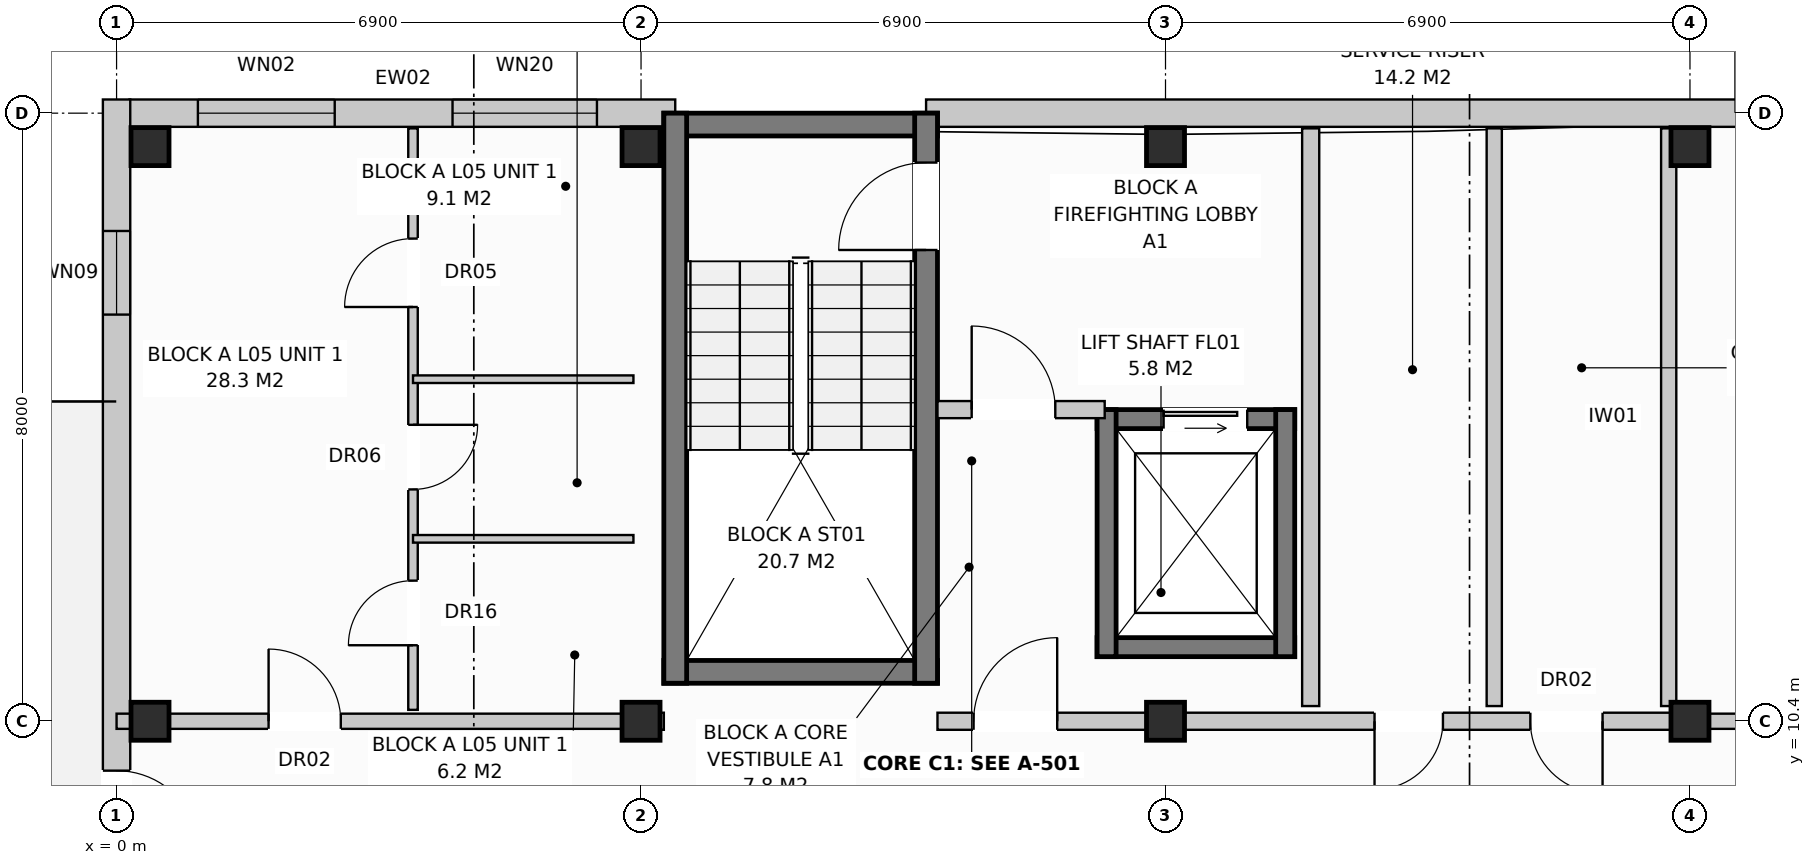
"""IFC4 building model, lengths in metres.
Left out: names, types, materials, properties, quantities, classifications, styles, units other than length and angle.
Written with IfcOpenShell. Run it as: python <this file> out.ifc"""

import sys

from ifc_helpers import new_model, si_unit, direction, frame, frame_2d, origin, origin_with_axes, origin_2d, place, context, subcontext, project, spatial, rectangle, extrude, element, fill, save


model = new_model("IFC4")
c1 = context("Model", 3, precision=1e-05, world=origin(), true_north=direction((0.0, 1.0)))
c2 = subcontext(c1, "Body", "Model", "MODEL_VIEW")
j1 = project(units=[si_unit("LENGTHUNIT", "METRE"), si_unit("PLANEANGLEUNIT", "RADIAN")], contexts=[c1])
p1 = place(None, origin())
s1 = spatial("IfcSite", under=j1, at=p1, CompositionType="ELEMENT")
p2 = place(p1, origin())
s2 = spatial("IfcBuilding", under=s1, at=p2, CompositionType="ELEMENT")
p3 = place(p2, frame((0.0, 0.0, 17.6)))
s3 = spatial("IfcBuildingStorey", under=s2, at=p3, CompositionType="ELEMENT", Elevation=17.6)
for number, where, z_axis, x_axis in (
    (1, (0.44, 10.4, 0.0), (0.0, 0.0, 1.0), (1.0, 0.0, 0.0)),
    (2, (0.44, 17.96, 0.0), (0.0, 0.0, 1.0), (1.0, 0.0, 0.0)),
    (3, (6.9, 10.4, 0.0), (0.0, 0.0, 1.0), (1.0, 0.0, 0.0)),
    (4, (6.9, 17.96, 0.0), (0.0, 0.0, 1.0), (1.0, 0.0, 0.0)),
    (5, (13.8, 10.4, 0.0), (0.0, 0.0, 1.0), (1.0, 0.0, 0.0)),
    (6, (13.8, 17.96, 0.0), (0.0, 0.0, 1.0), (1.0, 0.0, 0.0)),
    (7, (20.7, 10.4, 0.0), (0.0, 0.0, 1.0), (1.0, 0.0, 0.0)),
    (8, (20.7, 17.96, 0.0), (0.0, 0.0, 1.0), (1.0, 0.0, 0.0)),
):
    element("IfcColumn", number, at=place(p3, frame(where, z_axis=z_axis, x_axis=x_axis)), inside=s3, PredefinedType="COLUMN", context=c2, shape_type="SweptSolid", body=[
        extrude(rectangle(XDim=0.5, YDim=0.5, at=origin_2d()), origin(), (0.0, 0.0, 1.0), 3.2),
    ])
p4 = place(p3, frame((0.17, 18.4, 0.0), z_axis=(0.0, 0.0, 1.0), x_axis=(1.0, 0.0, 0.0)))
e9 = element("IfcWall", 9, at=p4, inside=s3, PredefinedType="STANDARD", context=c2, shape_type="SweptSolid", body=[
    extrude(rectangle(XDim=7.18, YDim=0.36, at=frame_2d((3.59, 0.0))), origin(), (0.0, 0.0, 1.0), 2.95),
])
p5 = place(p4, frame((0.9, 0.0, 0.8)))
e10 = element("IfcOpeningElement", 10, at=p5, cuts=e9, PredefinedType="OPENING", context=c2, shape_type="SweptSolid", body=[
    extrude(rectangle(XDim=1.8, YDim=1.7, at=frame_2d((0.9, 0.85))), frame((0.0, 0.192, 0.0), z_axis=(0.0, -1.0, 0.0), x_axis=(1.0, 0.0, 0.0)), (0.0, 0.0, 1.0), 0.384),
])
p6 = place(p4, frame((4.25, 0.0, 0.8)))
e11 = element("IfcOpeningElement", 11, at=p6, cuts=e9, PredefinedType="OPENING", context=c2, shape_type="SweptSolid", body=[
    extrude(rectangle(XDim=1.9, YDim=1.85, at=frame_2d((0.95, 0.925))), frame((0.0, 0.192, 0.0), z_axis=(0.0, -1.0, 0.0), x_axis=(1.0, 0.0, 0.0)), (0.0, 0.0, 1.0), 0.384),
])
p7 = place(p3, frame((10.65, 18.4, 0.0), z_axis=(0.0, 0.0, 1.0), x_axis=(1.0, 0.0, 0.0)))
e12 = element("IfcWall", 12, at=p7, inside=s3, PredefinedType="STANDARD", context=c2, shape_type="SweptSolid", body=[
    extrude(rectangle(XDim=17.4, YDim=0.36, at=frame_2d((8.7, 0.0))), origin(), (0.0, 0.0, 1.0), 2.95),
])
p8 = place(p7, frame((11.87, 0.0, 0.0)))
e13 = element("IfcOpeningElement", 13, at=p8, cuts=e12, PredefinedType="OPENING", context=c2, shape_type="SweptSolid", body=[
    extrude(rectangle(XDim=0.95, YDim=2.1, at=frame_2d((0.475, 1.05))), frame((0.0, 0.192, 0.0), z_axis=(0.0, -1.0, 0.0), x_axis=(1.0, 0.0, 0.0)), (0.0, 0.0, 1.0), 0.384),
])
p9 = place(p7, frame((14.87, 0.0, 0.72)))
e14 = element("IfcOpeningElement", 14, at=p9, cuts=e12, PredefinedType="OPENING", context=c2, shape_type="SweptSolid", body=[
    extrude(rectangle(XDim=1.1, YDim=1.5, at=frame_2d((0.55, 0.75))), frame((0.0, 0.192, 0.0), z_axis=(0.0, -1.0, 0.0), x_axis=(1.0, 0.0, 0.0)), (0.0, 0.0, 1.0), 0.384),
])
p10 = place(p3, frame((0.0, -0.18, 0.0), z_axis=(0.0, 0.0, 1.0), x_axis=(0.0, 1.0, 0.0)))
e15 = element("IfcWall", 15, at=p10, inside=s3, PredefinedType="STANDARD", context=c2, shape_type="SweptSolid", body=[
    extrude(rectangle(XDim=18.76, YDim=0.36, at=frame_2d((9.38, 0.0))), origin(), (0.0, 0.0, 1.0), 2.95),
])
p11 = place(p10, frame((8.83, 0.0, 0.0)))
e16 = element("IfcOpeningElement", 16, at=p11, cuts=e15, PredefinedType="OPENING", context=c2, shape_type="SweptSolid", body=[
    extrude(rectangle(XDim=1.1, YDim=2.1, at=frame_2d((0.55, 1.05))), frame((0.0, 0.192, 0.0), z_axis=(0.0, -1.0, 0.0), x_axis=(1.0, 0.0, 0.0)), (0.0, 0.0, 1.0), 0.384),
])
p12 = place(p10, frame((1.73, 0.0, 0.72)))
e17 = element("IfcOpeningElement", 17, at=p12, cuts=e15, PredefinedType="OPENING", context=c2, shape_type="SweptSolid", body=[
    extrude(rectangle(XDim=1.1, YDim=1.5, at=frame_2d((0.55, 0.75))), frame((0.0, 0.192, 0.0), z_axis=(0.0, -1.0, 0.0), x_axis=(1.0, 0.0, 0.0)), (0.0, 0.0, 1.0), 0.384),
])
p13 = place(p10, frame((15.93, 0.0, 0.72)))
e18 = element("IfcOpeningElement", 18, at=p13, cuts=e15, PredefinedType="OPENING", context=c2, shape_type="SweptSolid", body=[
    extrude(rectangle(XDim=1.1, YDim=1.5, at=frame_2d((0.55, 0.75))), frame((0.0, 0.192, 0.0), z_axis=(0.0, -1.0, 0.0), x_axis=(1.0, 0.0, 0.0)), (0.0, 0.0, 1.0), 0.384),
])
for number, where, z_axis, x_axis in (
    (19, (7.2, 18.25, 0.0), (0.0, 0.0, 1.0), (1.0, 0.0, 0.0)),
    (20, (7.2, 11.05, 0.0), (0.0, 0.0, 1.0), (1.0, 0.0, 0.0)),
):
    element("IfcWall", number, at=place(p3, frame(where, z_axis=z_axis, x_axis=x_axis)), inside=s3, PredefinedType="SHEAR", context=c2, shape_type="SweptSolid", body=[
        extrude(rectangle(XDim=3.6, YDim=0.3, at=frame_2d((1.8, 0.0))), origin(), (0.0, 0.0, 1.0), 2.95),
    ])
p14 = place(p3, frame((7.35, 10.9, 0.0), z_axis=(0.0, 0.0, 1.0), x_axis=(0.0, 1.0, 0.0)))
e21 = element("IfcWall", 21, at=p14, inside=s3, PredefinedType="SHEAR", context=c2, shape_type="SweptSolid", body=[
    extrude(rectangle(XDim=7.5, YDim=0.3, at=frame_2d((3.75, 0.0))), origin(), (0.0, 0.0, 1.0), 2.95),
])
p15 = place(p3, frame((10.65, 10.9, 0.0), z_axis=(0.0, 0.0, 1.0), x_axis=(0.0, 1.0, 0.0)))
e22 = element("IfcWall", 22, at=p15, inside=s3, PredefinedType="SHEAR", context=c2, shape_type="SweptSolid", body=[
    extrude(rectangle(XDim=7.5, YDim=0.3, at=frame_2d((3.75, 0.0))), origin(), (0.0, 0.0, 1.0), 2.95),
])
p16 = place(p15, frame((5.7, 0.0, 0.0)))
e23 = element("IfcOpeningElement", 23, at=p16, cuts=e22, PredefinedType="OPENING", context=c2, shape_type="SweptSolid", body=[
    extrude(rectangle(XDim=1.15, YDim=2.15, at=frame_2d((0.575, 1.075))), frame((0.0, 0.162, 0.0), z_axis=(0.0, -1.0, 0.0), x_axis=(1.0, 0.0, 0.0)), (0.0, 0.0, 1.0), 0.324),
])
p17 = place(p3, frame((12.9, 14.375, 0.0), z_axis=(0.0, 0.0, 1.0), x_axis=(1.0, 0.0, 0.0)))
e24 = element("IfcWall", 24, at=p17, inside=s3, PredefinedType="SHEAR", context=c2, shape_type="SweptSolid", body=[
    extrude(rectangle(XDim=2.6, YDim=0.25, at=frame_2d((1.3, 0.0))), origin(), (0.0, 0.0, 1.0), 2.95),
])
p18 = place(p17, frame((0.875, 0.0, 0.0)))
e25 = element("IfcOpeningElement", 25, at=p18, cuts=e24, PredefinedType="OPENING", context=c2, shape_type="SweptSolid", body=[
    extrude(rectangle(XDim=1.1, YDim=2.1, at=frame_2d((0.55, 1.05))), frame((0.0, 0.137, 0.0), z_axis=(0.0, -1.0, 0.0), x_axis=(1.0, 0.0, 0.0)), (0.0, 0.0, 1.0), 0.274),
])
p19 = place(p3, frame((12.9, 11.375, 0.0), z_axis=(0.0, 0.0, 1.0), x_axis=(1.0, 0.0, 0.0)))
e26 = element("IfcWall", 26, at=p19, inside=s3, PredefinedType="SHEAR", context=c2, shape_type="SweptSolid", body=[
    extrude(rectangle(XDim=2.6, YDim=0.25, at=frame_2d((1.3, 0.0))), origin(), (0.0, 0.0, 1.0), 2.95),
])
for number, where, z_axis, x_axis in (
    (27, (13.025, 11.25, 0.0), (0.0, 0.0, 1.0), (0.0, 1.0, 0.0)),
    (28, (15.375, 11.25, 0.0), (0.0, 0.0, 1.0), (0.0, 1.0, 0.0)),
):
    element("IfcWall", number, at=place(p3, frame(where, z_axis=z_axis, x_axis=x_axis)), inside=s3, PredefinedType="SHEAR", context=c2, shape_type="SweptSolid", body=[
        extrude(rectangle(XDim=3.25, YDim=0.25, at=frame_2d((1.625, 0.0))), origin(), (0.0, 0.0, 1.0), 2.95),
    ])
p20 = place(p3, frame((15.71, 10.6, 0.0), z_axis=(0.0, 0.0, 1.0), x_axis=(0.0, 1.0, 0.0)))
e29 = element("IfcWall", 29, at=p20, inside=s3, PredefinedType="PARTITIONING", context=c2, shape_type="SweptSolid", body=[
    extrude(rectangle(XDim=7.6, YDim=0.225, at=frame_2d((3.8, 0.0))), origin(), (0.0, 0.0, 1.0), 2.59),
])
p21 = place(p3, frame((10.8, 14.5, 0.0), z_axis=(0.0, 0.0, 1.0), x_axis=(1.0, 0.0, 0.0)))
e30 = element("IfcWall", 30, at=p21, inside=s3, PredefinedType="PARTITIONING", context=c2, shape_type="SweptSolid", body=[
    extrude(rectangle(XDim=2.2, YDim=0.225, at=frame_2d((1.1, 0.0))), origin(), (0.0, 0.0, 1.0), 2.95),
])
p22 = place(p21, frame((0.45, 0.0, 0.0)))
e31 = element("IfcOpeningElement", 31, at=p22, cuts=e30, PredefinedType="OPENING", context=c2, shape_type="SweptSolid", body=[
    extrude(rectangle(XDim=1.1, YDim=2.15, at=frame_2d((0.55, 1.075))), frame((0.0, 0.125, 0.0), z_axis=(0.0, -1.0, 0.0), x_axis=(1.0, 0.0, 0.0)), (0.0, 0.0, 1.0), 0.249),
])
p23 = place(p3, frame((6.9, 10.4, 0.0), z_axis=(0.0, 0.0, 1.0), x_axis=(1.0, 0.0, 0.0)))
e32 = element("IfcWall", 32, at=p23, inside=s3, PredefinedType="PARTITIONING", context=c2, shape_type="SweptSolid", body=[
    extrude(rectangle(XDim=0.3, YDim=0.225, at=frame_2d((0.15, 0.0))), origin(), (0.0, 0.0, 1.0), 2.95),
])
for number, where, z_axis, x_axis in (
    (33, (18.125, 10.6, 0.0), (0.0, 0.0, 1.0), (0.0, 1.0, 0.0)),
    (34, (20.42, 10.6, 0.0), (0.0, 0.0, 1.0), (0.0, 1.0, 0.0)),
):
    element("IfcWall", number, at=place(p3, frame(where, z_axis=z_axis, x_axis=x_axis)), inside=s3, PredefinedType="PARTITIONING", context=c2, shape_type="SweptSolid", body=[
        extrude(rectangle(XDim=7.6, YDim=0.2, at=frame_2d((3.8, 0.0))), origin(), (0.0, 0.0, 1.0), 2.95),
    ])
p24 = place(p3, frame((10.8, 10.4, 0.0), z_axis=(0.0, 0.0, 1.0), x_axis=(1.0, 0.0, 0.0)))
e35 = element("IfcWall", 35, at=p24, inside=s3, PredefinedType="PARTITIONING", context=c2, shape_type="SweptSolid", body=[
    extrude(rectangle(XDim=9.9, YDim=0.225, at=frame_2d((4.95, 0.0))), origin(), (0.0, 0.0, 1.0), 2.39),
])
p25 = place(p24, frame((0.475, 0.0, 0.0)))
e36 = element("IfcOpeningElement", 36, at=p25, cuts=e35, PredefinedType="OPENING", context=c2, shape_type="SweptSolid", body=[
    extrude(rectangle(XDim=1.1, YDim=2.15, at=frame_2d((0.55, 1.075))), frame((0.0, 0.125, 0.0), z_axis=(0.0, -1.0, 0.0), x_axis=(1.0, 0.0, 0.0)), (0.0, 0.0, 1.0), 0.249),
])
p26 = place(p24, frame((5.75, 0.0, 0.0)))
e37 = element("IfcOpeningElement", 37, at=p26, cuts=e35, PredefinedType="OPENING", context=c2, shape_type="SweptSolid", body=[
    extrude(rectangle(XDim=0.9, YDim=2.1, at=frame_2d((0.45, 1.05))), frame((0.0, 0.125, 0.0), z_axis=(0.0, -1.0, 0.0), x_axis=(1.0, 0.0, 0.0)), (0.0, 0.0, 1.0), 0.249),
])
p27 = place(p24, frame((7.8, 0.0, 0.0)))
e38 = element("IfcOpeningElement", 38, at=p27, cuts=e35, PredefinedType="OPENING", context=c2, shape_type="SweptSolid", body=[
    extrude(rectangle(XDim=0.95, YDim=2.15, at=frame_2d((0.475, 1.075))), frame((0.0, 0.125, 0.0), z_axis=(0.0, -1.0, 0.0), x_axis=(1.0, 0.0, 0.0)), (0.0, 0.0, 1.0), 0.249),
])
p28 = place(p3, frame((0.0, 10.4, 0.0), z_axis=(0.0, 0.0, 1.0), x_axis=(1.0, 0.0, 0.0)))
e39 = element("IfcWall", 39, at=p28, inside=s3, PredefinedType="PARTITIONING", context=c2, shape_type="SweptSolid", body=[
    extrude(rectangle(XDim=6.9, YDim=0.2, at=frame_2d((3.45, 0.0))), origin(), (0.0, 0.0, 1.0), 2.39),
])
p29 = place(p28, frame((2.0, 0.0, 0.0)))
e40 = element("IfcOpeningElement", 40, at=p29, cuts=e39, PredefinedType="OPENING", context=c2, shape_type="SweptSolid", body=[
    extrude(rectangle(XDim=0.95, YDim=2.15, at=frame_2d((0.475, 1.075))), frame((0.0, 0.112, 0.0), z_axis=(0.0, -1.0, 0.0), x_axis=(1.0, 0.0, 0.0)), (0.0, 0.0, 1.0), 0.224),
])
p30 = place(p3, frame((3.9, 10.55, 0.0), z_axis=(0.0, 0.0, 1.0), x_axis=(0.0, 1.0, 0.0)))
e41 = element("IfcWall", 41, at=p30, inside=s3, PredefinedType="PARTITIONING", context=c2, shape_type="SweptSolid", body=[
    extrude(rectangle(XDim=7.65, YDim=0.125, at=frame_2d((3.825, 0.0))), origin(), (0.0, 0.0, 1.0), 2.95),
])
p31 = place(p30, frame((0.85, 0.0, 0.0)))
e42 = element("IfcOpeningElement", 42, at=p31, cuts=e41, PredefinedType="OPENING", context=c2, shape_type="SweptSolid", body=[
    extrude(rectangle(XDim=0.85, YDim=2.1, at=frame_2d((0.425, 1.05))), frame((0.0, 0.074, 0.0), z_axis=(0.0, -1.0, 0.0), x_axis=(1.0, 0.0, 0.0)), (0.0, 0.0, 1.0), 0.149),
])
p32 = place(p30, frame((2.9, 0.0, 0.0)))
e43 = element("IfcOpeningElement", 43, at=p32, cuts=e41, PredefinedType="OPENING", context=c2, shape_type="SweptSolid", body=[
    extrude(rectangle(XDim=0.85, YDim=2.05, at=frame_2d((0.425, 1.025))), frame((0.0, 0.074, 0.0), z_axis=(0.0, -1.0, 0.0), x_axis=(1.0, 0.0, 0.0)), (0.0, 0.0, 1.0), 0.149),
])
p33 = place(p30, frame((5.3, 0.0, 0.0)))
e44 = element("IfcOpeningElement", 44, at=p33, cuts=e41, PredefinedType="OPENING", context=c2, shape_type="SweptSolid", body=[
    extrude(rectangle(XDim=0.9, YDim=2.1, at=frame_2d((0.45, 1.05))), frame((0.0, 0.074, 0.0), z_axis=(0.0, -1.0, 0.0), x_axis=(1.0, 0.0, 0.0)), (0.0, 0.0, 1.0), 0.149),
])
for number, where, z_axis, x_axis in (
    (45, (3.9, 12.8, 0.0), (0.0, 0.0, 1.0), (1.0, 0.0, 0.0)),
    (46, (3.9, 14.9, 0.0), (0.0, 0.0, 1.0), (1.0, 0.0, 0.0)),
):
    element("IfcWall", number, at=place(p3, frame(where, z_axis=z_axis, x_axis=x_axis)), inside=s3, PredefinedType="PARTITIONING", context=c2, shape_type="SweptSolid", body=[
        extrude(rectangle(XDim=2.9, YDim=0.1, at=frame_2d((1.45, 0.0))), origin(), (0.0, 0.0, 1.0), 2.95),
    ])
p34 = place(p3, frame((20.7, 10.4, 0.0), z_axis=(0.0, 0.0, 1.0), x_axis=(1.0, 0.0, 0.0)))
e47 = element("IfcWall", 47, at=p34, inside=s3, PredefinedType="PARTITIONING", context=c2, shape_type="SweptSolid", body=[
    extrude(rectangle(XDim=6.9, YDim=0.2, at=frame_2d((3.45, 0.0))), origin(), (0.0, 0.0, 1.0), 2.39),
])
p35 = place(p34, frame((2.0, 0.0, 0.0)))
e48 = element("IfcOpeningElement", 48, at=p35, cuts=e47, PredefinedType="OPENING", context=c2, shape_type="SweptSolid", body=[
    extrude(rectangle(XDim=0.95, YDim=2.15, at=frame_2d((0.475, 1.075))), frame((0.0, 0.112, 0.0), z_axis=(0.0, -1.0, 0.0), x_axis=(1.0, 0.0, 0.0)), (0.0, 0.0, 1.0), 0.224),
])
p36 = place(p5, origin_with_axes())
e49 = element("IfcWindow", 49, at=p36, inside=s3, PartitioningType="SINGLE_PANEL", PredefinedType="WINDOW", context=c2, shape_type="SweptSolid", body=[
    extrude(rectangle(XDim=1.8, YDim=1.7, at=frame_2d((0.9, 0.85))), frame((0.0, 0.03, 0.0), z_axis=(0.0, -1.0, 0.0), x_axis=(1.0, 0.0, 0.0)), (0.0, 0.0, 1.0), 0.06),
])
fill(e10, e49)
p37 = place(p6, origin_with_axes())
e50 = element("IfcWindow", 50, at=p37, inside=s3, PartitioningType="SINGLE_PANEL", PredefinedType="WINDOW", context=c2, shape_type="SweptSolid", body=[
    extrude(rectangle(XDim=1.9, YDim=1.85, at=frame_2d((0.95, 0.925))), frame((0.0, 0.03, 0.0), z_axis=(0.0, -1.0, 0.0), x_axis=(1.0, 0.0, 0.0)), (0.0, 0.0, 1.0), 0.06),
])
fill(e11, e50)
p38 = place(p11, frame((1.1, 0.0, 0.0), z_axis=(0.0, 0.0, 1.0), x_axis=(-1.0, 0.0, 0.0)))
e51 = element("IfcDoor", 51, at=p38, inside=s3, OperationType="SINGLE_SWING_LEFT", PredefinedType="DOOR", context=c2, shape_type="SweptSolid", body=[
    extrude(rectangle(XDim=1.1, YDim=2.1, at=frame_2d((0.55, 1.05))), frame((0.0, 0.025, 0.0), z_axis=(0.0, -1.0, 0.0), x_axis=(1.0, 0.0, 0.0)), (0.0, 0.0, 1.0), 0.05),
])
fill(e16, e51)
p39 = place(p13, origin_with_axes())
e52 = element("IfcWindow", 52, at=p39, inside=s3, PartitioningType="SINGLE_PANEL", PredefinedType="WINDOW", context=c2, shape_type="SweptSolid", body=[
    extrude(rectangle(XDim=1.1, YDim=1.5, at=frame_2d((0.55, 0.75))), frame((0.0, 0.03, 0.0), z_axis=(0.0, -1.0, 0.0), x_axis=(1.0, 0.0, 0.0)), (0.0, 0.0, 1.0), 0.06),
])
fill(e18, e52)
p40 = place(p16, origin_with_axes())
e53 = element("IfcDoor", 53, at=p40, inside=s3, OperationType="SINGLE_SWING_LEFT", PredefinedType="DOOR", context=c2, shape_type="SweptSolid", body=[
    extrude(rectangle(XDim=1.15, YDim=2.15, at=frame_2d((0.575, 1.075))), frame((0.0, 0.025, 0.0), z_axis=(0.0, -1.0, 0.0), x_axis=(1.0, 0.0, 0.0)), (0.0, 0.0, 1.0), 0.05),
])
fill(e23, e53)
p41 = place(p18, origin_with_axes())
e54 = element("IfcDoor", 54, at=p41, inside=s3, OperationType="SLIDING_TO_LEFT", PredefinedType="DOOR", context=c2, shape_type="SweptSolid", body=[
    extrude(rectangle(XDim=1.1, YDim=2.1, at=frame_2d((0.55, 1.05))), frame((0.0, 0.025, 0.0), z_axis=(0.0, -1.0, 0.0), x_axis=(1.0, 0.0, 0.0)), (0.0, 0.0, 1.0), 0.05),
])
fill(e25, e54)
p42 = place(p22, origin_with_axes())
e55 = element("IfcDoor", 55, at=p42, inside=s3, OperationType="SINGLE_SWING_LEFT", PredefinedType="DOOR", context=c2, shape_type="SweptSolid", body=[
    extrude(rectangle(XDim=1.1, YDim=2.15, at=frame_2d((0.55, 1.075))), frame((0.0, 0.025, 0.0), z_axis=(0.0, -1.0, 0.0), x_axis=(1.0, 0.0, 0.0)), (0.0, 0.0, 1.0), 0.05),
])
fill(e31, e55)
p43 = place(p25, origin_with_axes())
e56 = element("IfcDoor", 56, at=p43, inside=s3, OperationType="SINGLE_SWING_RIGHT", PredefinedType="DOOR", context=c2, shape_type="SweptSolid", body=[
    extrude(rectangle(XDim=1.1, YDim=2.15, at=frame_2d((0.55, 1.075))), frame((0.0, 0.025, 0.0), z_axis=(0.0, -1.0, 0.0), x_axis=(1.0, 0.0, 0.0)), (0.0, 0.0, 1.0), 0.05),
])
fill(e36, e56)
p44 = place(p26, frame((0.9, 0.0, 0.0), z_axis=(0.0, 0.0, 1.0), x_axis=(-1.0, 0.0, 0.0)))
e57 = element("IfcDoor", 57, at=p44, inside=s3, OperationType="SINGLE_SWING_LEFT", PredefinedType="DOOR", context=c2, shape_type="SweptSolid", body=[
    extrude(rectangle(XDim=0.9, YDim=2.1, at=frame_2d((0.45, 1.05))), frame((0.0, 0.025, 0.0), z_axis=(0.0, -1.0, 0.0), x_axis=(1.0, 0.0, 0.0)), (0.0, 0.0, 1.0), 0.05),
])
fill(e37, e57)
p45 = place(p27, frame((0.95, 0.0, 0.0), z_axis=(0.0, 0.0, 1.0), x_axis=(-1.0, 0.0, 0.0)))
e58 = element("IfcDoor", 58, at=p45, inside=s3, OperationType="SINGLE_SWING_RIGHT", PredefinedType="DOOR", context=c2, shape_type="SweptSolid", body=[
    extrude(rectangle(XDim=0.95, YDim=2.15, at=frame_2d((0.475, 1.075))), frame((0.0, 0.025, 0.0), z_axis=(0.0, -1.0, 0.0), x_axis=(1.0, 0.0, 0.0)), (0.0, 0.0, 1.0), 0.05),
])
fill(e38, e58)
p46 = place(p29, origin_with_axes())
e59 = element("IfcDoor", 59, at=p46, inside=s3, OperationType="SINGLE_SWING_LEFT", PredefinedType="DOOR", context=c2, shape_type="SweptSolid", body=[
    extrude(rectangle(XDim=0.95, YDim=2.15, at=frame_2d((0.475, 1.075))), frame((0.0, 0.025, 0.0), z_axis=(0.0, -1.0, 0.0), x_axis=(1.0, 0.0, 0.0)), (0.0, 0.0, 1.0), 0.05),
])
fill(e40, e59)
p47 = place(p31, origin_with_axes())
e60 = element("IfcDoor", 60, at=p47, inside=s3, OperationType="SINGLE_SWING_LEFT", PredefinedType="DOOR", context=c2, shape_type="SweptSolid", body=[
    extrude(rectangle(XDim=0.85, YDim=2.1, at=frame_2d((0.425, 1.05))), frame((0.0, 0.025, 0.0), z_axis=(0.0, -1.0, 0.0), x_axis=(1.0, 0.0, 0.0)), (0.0, 0.0, 1.0), 0.05),
])
fill(e42, e60)
p48 = place(p32, frame((0.85, 0.0, 0.0), z_axis=(0.0, 0.0, 1.0), x_axis=(-1.0, 0.0, 0.0)))
e61 = element("IfcDoor", 61, at=p48, inside=s3, OperationType="SINGLE_SWING_RIGHT", PredefinedType="DOOR", context=c2, shape_type="SweptSolid", body=[
    extrude(rectangle(XDim=0.85, YDim=2.05, at=frame_2d((0.425, 1.025))), frame((0.0, 0.025, 0.0), z_axis=(0.0, -1.0, 0.0), x_axis=(1.0, 0.0, 0.0)), (0.0, 0.0, 1.0), 0.05),
])
fill(e43, e61)
p49 = place(p33, origin_with_axes())
e62 = element("IfcDoor", 62, at=p49, inside=s3, OperationType="SINGLE_SWING_LEFT", PredefinedType="DOOR", context=c2, shape_type="SweptSolid", body=[
    extrude(rectangle(XDim=0.9, YDim=2.1, at=frame_2d((0.45, 1.05))), frame((0.0, 0.025, 0.0), z_axis=(0.0, -1.0, 0.0), x_axis=(1.0, 0.0, 0.0)), (0.0, 0.0, 1.0), 0.05),
])
fill(e44, e62)
save(model, sys.argv[1])
